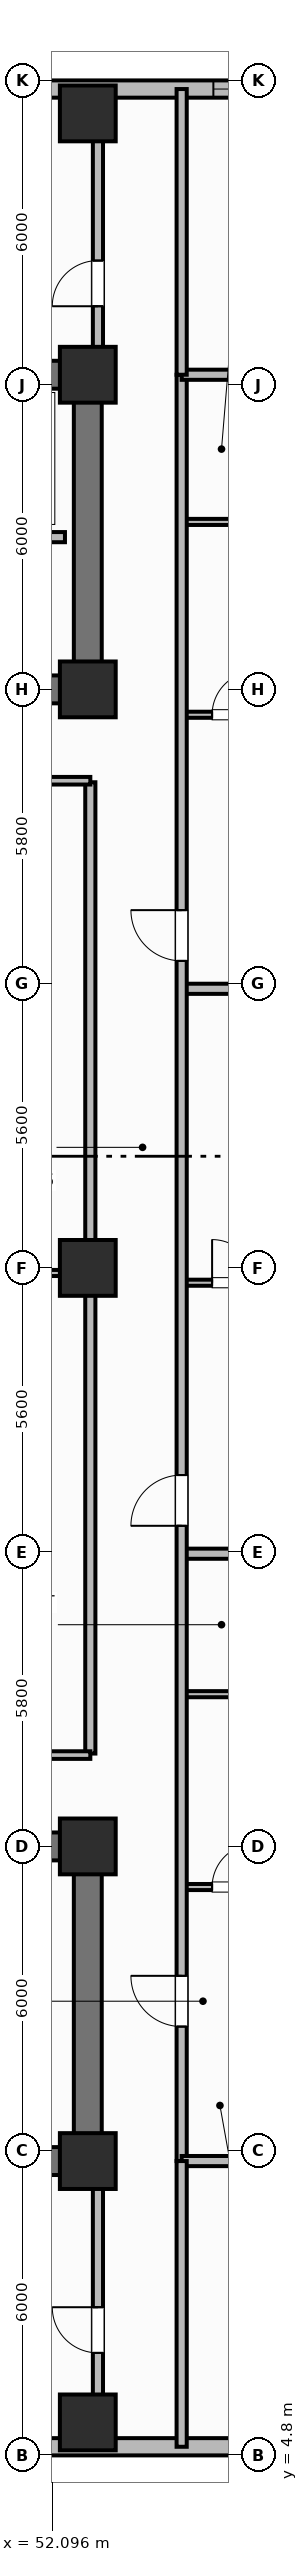
"""IFC4 building model, lengths in metres.
Left out: names, types, materials, properties, quantities, classifications, styles, units other than length and angle.
Written with IfcOpenShell. Run it as: python <this file> out.ifc"""

import sys

from ifc_helpers import new_model, si_unit, direction, frame, frame_2d, origin, origin_2d, place, context, subcontext, project, spatial, rectangle, extrude, element, fill, save


model = new_model("IFC4")
c1 = context("Model", 3, precision=1e-05, world=origin(), true_north=direction((0.0, 1.0)))
c2 = subcontext(c1, "Body", "Model", "MODEL_VIEW")
j1 = project(units=[si_unit("LENGTHUNIT", "METRE"), si_unit("PLANEANGLEUNIT", "RADIAN")], contexts=[c1])
p1 = place(None, origin())
s1 = spatial("IfcSite", under=j1, at=p1, CompositionType="ELEMENT")
p2 = place(p1, origin())
s2 = spatial("IfcBuilding", under=s1, at=p2, CompositionType="ELEMENT")
p3 = place(p2, frame((0.0, 0.0, 121.6)))
s3 = spatial("IfcBuildingStorey", under=s2, at=p3, CompositionType="ELEMENT", Elevation=121.6)
p4 = place(p3, frame((52.8, 10.6, 0.0), z_axis=(0.0, 0.0, 1.0), x_axis=(-1.0, 0.0, 0.0)))
e1 = element("IfcWall", 1, at=p4, inside=s3, PredefinedType="SHEAR", context=c2, shape_type="SweptSolid", body=[
    extrude(rectangle(XDim=27.2, YDim=0.55, at=frame_2d((13.6, 0.0))), origin(), (0.0, 0.0, 1.0), 3.7),
])
p5 = place(p3, frame((52.8, 10.875, 0.0), z_axis=(0.0, 0.0, 1.0), x_axis=(0.0, 1.0, 0.0)))
e2 = element("IfcWall", 2, at=p5, inside=s3, PredefinedType="SHEAR", context=c2, shape_type="SweptSolid", body=[
    extrude(rectangle(XDim=5.65, YDim=0.55, at=frame_2d((2.825, 0.0))), origin(), (0.0, 0.0, 1.0), 3.7),
])
p6 = place(p3, frame((25.6, 16.8, 0.0), z_axis=(0.0, 0.0, 1.0), x_axis=(1.0, 0.0, 0.0)))
e3 = element("IfcWall", 3, at=p6, inside=s3, PredefinedType="SHEAR", context=c2, shape_type="SweptSolid", body=[
    extrude(rectangle(XDim=27.2, YDim=0.55, at=frame_2d((13.6, 0.0))), origin(), (0.0, 0.0, 1.0), 3.7),
])
p7 = place(p6, frame((1.9, 0.0, 0.0)))
e4 = element("IfcOpeningElement", 4, at=p7, cuts=e3, PredefinedType="OPENING", context=c2, shape_type="SweptSolid", body=[
    extrude(rectangle(XDim=1.1, YDim=2.15, at=frame_2d((0.55, 1.075))), frame((0.0, 0.285, 0.0), z_axis=(0.0, -1.0, 0.0), x_axis=(1.0, 0.0, 0.0)), (0.0, 0.0, 1.0), 0.57),
])
p8 = place(p6, frame((13.0, 0.0, 0.0)))
e5 = element("IfcOpeningElement", 5, at=p8, cuts=e3, PredefinedType="OPENING", context=c2, shape_type="SweptSolid", body=[
    extrude(rectangle(XDim=1.2, YDim=2.15, at=frame_2d((0.6, 1.075))), frame((0.0, 0.285, 0.0), z_axis=(0.0, -1.0, 0.0), x_axis=(1.0, 0.0, 0.0)), (0.0, 0.0, 1.0), 0.57),
])
p9 = place(p6, frame((21.6, 0.0, 0.0)))
e6 = element("IfcOpeningElement", 6, at=p9, cuts=e3, PredefinedType="OPENING", context=c2, shape_type="SweptSolid", body=[
    extrude(rectangle(XDim=1.0, YDim=2.15, at=frame_2d((0.5, 1.075))), frame((0.0, 0.285, 0.0), z_axis=(0.0, -1.0, 0.0), x_axis=(1.0, 0.0, 0.0)), (0.0, 0.0, 1.0), 0.57),
])
p10 = place(p3, frame((25.6, 45.8, 0.0), z_axis=(0.0, 0.0, 1.0), x_axis=(1.0, 0.0, 0.0)))
e7 = element("IfcWall", 7, at=p10, inside=s3, PredefinedType="SHEAR", context=c2, shape_type="SweptSolid", body=[
    extrude(rectangle(XDim=27.2, YDim=0.55, at=frame_2d((13.6, 0.0))), origin(), (0.0, 0.0, 1.0), 3.7),
])
p11 = place(p3, frame((52.8, 39.875, 0.0), z_axis=(0.0, 0.0, 1.0), x_axis=(0.0, 1.0, 0.0)))
e8 = element("IfcWall", 8, at=p11, inside=s3, PredefinedType="SHEAR", context=c2, shape_type="SweptSolid", body=[
    extrude(rectangle(XDim=5.65, YDim=0.55, at=frame_2d((2.825, 0.0))), origin(), (0.0, 0.0, 1.0), 3.7),
])
p12 = place(p3, frame((52.8, 39.6, 0.0), z_axis=(0.0, 0.0, 1.0), x_axis=(-1.0, 0.0, 0.0)))
e9 = element("IfcWall", 9, at=p12, inside=s3, PredefinedType="SHEAR", context=c2, shape_type="SweptSolid", body=[
    extrude(rectangle(XDim=27.2, YDim=0.55, at=frame_2d((13.6, 0.0))), origin(), (0.0, 0.0, 1.0), 3.7),
])
p13 = place(p12, frame((24.2, 0.0, 0.0)))
e10 = element("IfcOpeningElement", 10, at=p13, cuts=e9, PredefinedType="OPENING", context=c2, shape_type="SweptSolid", body=[
    extrude(rectangle(XDim=1.1, YDim=2.15, at=frame_2d((0.55, 1.075))), frame((0.0, 0.285, 0.0), z_axis=(0.0, -1.0, 0.0), x_axis=(1.0, 0.0, 0.0)), (0.0, 0.0, 1.0), 0.57),
])
p14 = place(p12, frame((15.1, 0.0, 0.0)))
e11 = element("IfcOpeningElement", 11, at=p14, cuts=e9, PredefinedType="OPENING", context=c2, shape_type="SweptSolid", body=[
    extrude(rectangle(XDim=1.2, YDim=2.15, at=frame_2d((0.6, 1.075))), frame((0.0, 0.285, 0.0), z_axis=(0.0, -1.0, 0.0), x_axis=(1.0, 0.0, 0.0)), (0.0, 0.0, 1.0), 0.57),
])
p15 = place(p12, frame((11.3, 0.0, 0.0)))
e12 = element("IfcOpeningElement", 12, at=p15, cuts=e9, PredefinedType="OPENING", context=c2, shape_type="SweptSolid", body=[
    extrude(rectangle(XDim=1.3, YDim=2.2, at=frame_2d((0.65, 1.1))), frame((0.0, 0.285, 0.0), z_axis=(0.0, -1.0, 0.0), x_axis=(1.0, 0.0, 0.0)), (0.0, 0.0, 1.0), 0.57),
])
p16 = place(p12, frame((7.25, 0.0, 0.0)))
e13 = element("IfcOpeningElement", 13, at=p16, cuts=e9, PredefinedType="OPENING", context=c2, shape_type="SweptSolid", body=[
    extrude(rectangle(XDim=0.85, YDim=2.1, at=frame_2d((0.425, 1.05))), frame((0.0, 0.285, 0.0), z_axis=(0.0, -1.0, 0.0), x_axis=(1.0, 0.0, 0.0)), (0.0, 0.0, 1.0), 0.57),
])
p17 = place(p12, frame((3.0, 0.0, 0.0)))
e14 = element("IfcOpeningElement", 14, at=p17, cuts=e9, PredefinedType="OPENING", context=c2, shape_type="SweptSolid", body=[
    extrude(rectangle(XDim=0.9, YDim=2.1, at=frame_2d((0.45, 1.05))), frame((0.0, 0.285, 0.0), z_axis=(0.0, -1.0, 0.0), x_axis=(1.0, 0.0, 0.0)), (0.0, 0.0, 1.0), 0.57),
])
for number, where, z_axis, x_axis in (
    (15, (52.8, 10.6, 0.0), (0.0, 0.0, 1.0), (1.0, 0.0, 0.0)),
    (16, (52.8, 16.8, 0.0), (0.0, 0.0, 1.0), (1.0, 0.0, 0.0)),
    (17, (52.8, 39.6, 0.0), (0.0, 0.0, 1.0), (1.0, 0.0, 0.0)),
    (18, (52.8, 45.8, 0.0), (0.0, 0.0, 1.0), (1.0, 0.0, 0.0)),
    (19, (52.8, 28.2, 0.0), (0.0, 0.0, 1.0), (1.0, 0.0, 0.0)),
    (20, (52.8, 5.45, 0.0), (0.0, 0.0, 1.0), (1.0, 0.0, 0.0)),
    (21, (52.8, 50.95, 0.0), (0.0, 0.0, 1.0), (1.0, 0.0, 0.0)),
):
    element("IfcColumn", number, at=place(p3, frame(where, z_axis=z_axis, x_axis=x_axis)), inside=s3, PredefinedType="COLUMN", context=c2, shape_type="SweptSolid", body=[
        extrude(rectangle(XDim=1.1, YDim=1.1, at=origin_2d()), origin(), (0.0, 0.0, 1.0), 3.7),
    ])
p18 = place(p3, frame((42.4, 4.97, 0.0), z_axis=(0.0, 0.0, 1.0), x_axis=(1.0, 0.0, 0.0)))
e22 = element("IfcWall", 22, at=p18, inside=s3, PredefinedType="SOLIDWALL", context=c2, shape_type="SweptSolid", body=[
    extrude(rectangle(XDim=17.4, YDim=0.34, at=frame_2d((8.7, 0.0))), origin(), (0.0, 0.0, 1.0), 2.7),
])
p19 = place(p18, frame((5.788, 0.0, 0.73)))
e23 = element("IfcOpeningElement", 23, at=p19, cuts=e22, PredefinedType="OPENING", context=c2, shape_type="SweptSolid", body=[
    extrude(rectangle(XDim=1.8, YDim=1.85, at=frame_2d((0.9, 0.925))), frame((0.0, 0.18, 0.0), z_axis=(0.0, -1.0, 0.0), x_axis=(1.0, 0.0, 0.0)), (0.0, 0.0, 1.0), 0.36),
])
p20 = place(p18, frame((13.837, 0.0, 0.73)))
e24 = element("IfcOpeningElement", 24, at=p20, cuts=e22, PredefinedType="OPENING", context=c2, shape_type="SweptSolid", body=[
    extrude(rectangle(XDim=1.8, YDim=1.85, at=frame_2d((0.9, 0.925))), frame((0.0, 0.18, 0.0), z_axis=(0.0, -1.0, 0.0), x_axis=(1.0, 0.0, 0.0)), (0.0, 0.0, 1.0), 0.36),
])
p21 = place(p3, frame((59.8, 51.43, 0.0), z_axis=(0.0, 0.0, 1.0), x_axis=(-1.0, 0.0, 0.0)))
e25 = element("IfcWall", 25, at=p21, inside=s3, PredefinedType="SOLIDWALL", context=c2, shape_type="SweptSolid", body=[
    extrude(rectangle(XDim=17.4, YDim=0.34, at=frame_2d((8.7, 0.0))), origin(), (0.0, 0.0, 1.0), 2.7),
])
p22 = place(p21, frame((1.442, 0.0, 0.93)))
e26 = element("IfcOpeningElement", 26, at=p22, cuts=e25, PredefinedType="OPENING", context=c2, shape_type="SweptSolid", body=[
    extrude(rectangle(XDim=1.1, YDim=1.65, at=frame_2d((0.55, 0.825))), frame((0.0, 0.18, 0.0), z_axis=(0.0, -1.0, 0.0), x_axis=(1.0, 0.0, 0.0)), (0.0, 0.0, 1.0), 0.36),
])
p23 = place(p21, frame((3.425, 0.0, 0.93)))
e27 = element("IfcOpeningElement", 27, at=p23, cuts=e25, PredefinedType="OPENING", context=c2, shape_type="SweptSolid", body=[
    extrude(rectangle(XDim=1.1, YDim=1.65, at=frame_2d((0.55, 0.825))), frame((0.0, 0.18, 0.0), z_axis=(0.0, -1.0, 0.0), x_axis=(1.0, 0.0, 0.0)), (0.0, 0.0, 1.0), 0.36),
])
p24 = place(p21, frame((9.492, 0.0, 0.93)))
e28 = element("IfcOpeningElement", 28, at=p24, cuts=e25, PredefinedType="OPENING", context=c2, shape_type="SweptSolid", body=[
    extrude(rectangle(XDim=1.1, YDim=1.65, at=frame_2d((0.55, 0.825))), frame((0.0, 0.18, 0.0), z_axis=(0.0, -1.0, 0.0), x_axis=(1.0, 0.0, 0.0)), (0.0, 0.0, 1.0), 0.36),
])
p25 = place(p21, frame((12.175, 0.0, 0.93)))
e29 = element("IfcOpeningElement", 29, at=p25, cuts=e25, PredefinedType="OPENING", context=c2, shape_type="SweptSolid", body=[
    extrude(rectangle(XDim=1.1, YDim=1.65, at=frame_2d((0.55, 0.825))), frame((0.0, 0.18, 0.0), z_axis=(0.0, -1.0, 0.0), x_axis=(1.0, 0.0, 0.0)), (0.0, 0.0, 1.0), 0.36),
])
p26 = place(p3, frame((52.35, 42.6, 0.0), z_axis=(0.0, 0.0, 1.0), x_axis=(-1.0, 0.0, 0.0)))
e30 = element("IfcWall", 30, at=p26, inside=s3, PredefinedType="PARTITIONING", context=c2, shape_type="SweptSolid", body=[
    extrude(rectangle(XDim=8.8, YDim=0.2, at=frame_2d((4.4, 0.0))), origin(), (0.0, 0.0, 1.0), 2.53),
])
p27 = place(p26, frame((7.1, 0.0, 0.0)))
e31 = element("IfcOpeningElement", 31, at=p27, cuts=e30, PredefinedType="OPENING", context=c2, shape_type="SweptSolid", body=[
    extrude(rectangle(XDim=1.0, YDim=2.15, at=frame_2d((0.5, 1.075))), frame((0.0, 0.11, 0.0), z_axis=(0.0, -1.0, 0.0), x_axis=(1.0, 0.0, 0.0)), (0.0, 0.0, 1.0), 0.22),
])
p28 = place(p3, frame((52.85, 18.63, 0.0), z_axis=(0.0, 0.0, 1.0), x_axis=(0.0, 1.0, 0.0)))
e32 = element("IfcWall", 32, at=p28, inside=s3, PredefinedType="PARTITIONING", context=c2, shape_type="SweptSolid", body=[
    extrude(rectangle(XDim=19.14, YDim=0.2, at=frame_2d((9.57, 0.0))), origin(), (0.0, 0.0, 1.0), 2.53),
])
for number, where, z_axis, x_axis in (
    (33, (46.35, 18.6, 0.0), (0.0, 0.0, 1.0), (1.0, 0.0, 0.0)),
    (34, (46.35, 37.8, 0.0), (0.0, 0.0, 1.0), (1.0, 0.0, 0.0)),
):
    element("IfcWall", number, at=place(p3, frame(where, z_axis=z_axis, x_axis=x_axis)), inside=s3, PredefinedType="PARTITIONING", context=c2, shape_type="SweptSolid", body=[
        extrude(rectangle(XDim=6.5, YDim=0.15, at=frame_2d((3.25, 0.0))), origin(), (0.0, 0.0, 1.0), 2.53),
    ])
p29 = place(p3, frame((46.38, 28.1, 0.0), z_axis=(0.0, 0.0, 1.0), x_axis=(1.0, 0.0, 0.0)))
e35 = element("IfcWall", 35, at=p29, inside=s3, PredefinedType="PARTITIONING", context=c2, shape_type="SweptSolid", body=[
    extrude(rectangle(XDim=6.42, YDim=0.12, at=frame_2d((3.21, 0.0))), origin(), (0.0, 0.0, 1.0), 2.53),
])
p30 = place(p3, frame((54.65, 16.0, 0.0), z_axis=(0.0, 0.0, 1.0), x_axis=(1.0, 0.0, 0.0)))
e36 = element("IfcWall", 36, at=p30, inside=s3, PredefinedType="PARTITIONING", context=c2, shape_type="SweptSolid", body=[
    extrude(rectangle(XDim=2.25, YDim=0.12, at=frame_2d((1.125, 0.0))), origin(), (0.0, 0.0, 1.0), 2.53),
])
p31 = place(p30, frame((0.6, 0.0, 0.0)))
e37 = element("IfcOpeningElement", 37, at=p31, cuts=e36, PredefinedType="OPENING", context=c2, shape_type="SweptSolid", body=[
    extrude(rectangle(XDim=0.85, YDim=2.1, at=frame_2d((0.425, 1.05))), frame((0.0, 0.07, 0.0), z_axis=(0.0, -1.0, 0.0), x_axis=(1.0, 0.0, 0.0)), (0.0, 0.0, 1.0), 0.14),
])
p32 = place(p3, frame((54.65, 19.8, 0.0), z_axis=(0.0, 0.0, 1.0), x_axis=(1.0, 0.0, 0.0)))
e38 = element("IfcWall", 38, at=p32, inside=s3, PredefinedType="PARTITIONING", context=c2, shape_type="SweptSolid", body=[
    extrude(rectangle(XDim=2.25, YDim=0.12, at=frame_2d((1.125, 0.0))), origin(), (0.0, 0.0, 1.0), 2.53),
])
p33 = place(p3, frame((54.65, 22.568, 0.0), z_axis=(0.0, 0.0, 1.0), x_axis=(1.0, 0.0, 0.0)))
e39 = element("IfcWall", 39, at=p33, inside=s3, PredefinedType="PARTITIONING", context=c2, shape_type="SweptSolid", body=[
    extrude(rectangle(XDim=9.18, YDim=0.2, at=frame_2d((4.59, 0.0))), origin(), (0.0, 0.0, 1.0), 2.53),
])
p34 = place(p3, frame((54.65, 27.908, 0.0), z_axis=(0.0, 0.0, 1.0), x_axis=(1.0, 0.0, 0.0)))
e40 = element("IfcWall", 40, at=p34, inside=s3, PredefinedType="PARTITIONING", context=c2, shape_type="SweptSolid", body=[
    extrude(rectangle(XDim=2.25, YDim=0.12, at=frame_2d((1.125, 0.0))), origin(), (0.0, 0.0, 1.0), 2.53),
])
p35 = place(p34, frame((0.6, 0.0, 0.0)))
e41 = element("IfcOpeningElement", 41, at=p35, cuts=e40, PredefinedType="OPENING", context=c2, shape_type="SweptSolid", body=[
    extrude(rectangle(XDim=0.85, YDim=2.1, at=frame_2d((0.425, 1.05))), frame((0.0, 0.07, 0.0), z_axis=(0.0, -1.0, 0.0), x_axis=(1.0, 0.0, 0.0)), (0.0, 0.0, 1.0), 0.14),
])
p36 = place(p3, frame((54.65, 33.7, 0.0), z_axis=(0.0, 0.0, 1.0), x_axis=(1.0, 0.0, 0.0)))
e42 = element("IfcWall", 42, at=p36, inside=s3, PredefinedType="PARTITIONING", context=c2, shape_type="SweptSolid", body=[
    extrude(rectangle(XDim=9.18, YDim=0.2, at=frame_2d((4.59, 0.0))), origin(), (0.0, 0.0, 1.0), 2.53),
])
p37 = place(p3, frame((54.65, 39.1, 0.0), z_axis=(0.0, 0.0, 1.0), x_axis=(1.0, 0.0, 0.0)))
e43 = element("IfcWall", 43, at=p37, inside=s3, PredefinedType="PARTITIONING", context=c2, shape_type="SweptSolid", body=[
    extrude(rectangle(XDim=2.25, YDim=0.12, at=frame_2d((1.125, 0.0))), origin(), (0.0, 0.0, 1.0), 2.53),
])
p38 = place(p37, frame((0.6, 0.0, 0.0)))
e44 = element("IfcOpeningElement", 44, at=p38, cuts=e43, PredefinedType="OPENING", context=c2, shape_type="SweptSolid", body=[
    extrude(rectangle(XDim=0.85, YDim=2.1, at=frame_2d((0.425, 1.05))), frame((0.0, 0.07, 0.0), z_axis=(0.0, -1.0, 0.0), x_axis=(1.0, 0.0, 0.0)), (0.0, 0.0, 1.0), 0.14),
])
p39 = place(p3, frame((54.65, 42.9, 0.0), z_axis=(0.0, 0.0, 1.0), x_axis=(1.0, 0.0, 0.0)))
e45 = element("IfcWall", 45, at=p39, inside=s3, PredefinedType="PARTITIONING", context=c2, shape_type="SweptSolid", body=[
    extrude(rectangle(XDim=2.25, YDim=0.12, at=frame_2d((1.125, 0.0))), origin(), (0.0, 0.0, 1.0), 2.53),
])
p40 = place(p3, frame((54.65, 10.6, 0.0), z_axis=(0.0, 0.0, 1.0), x_axis=(0.0, 1.0, 0.0)))
e46 = element("IfcWall", 46, at=p40, inside=s3, PredefinedType="PARTITIONING", context=c2, shape_type="SweptSolid", body=[
    extrude(rectangle(XDim=35.2, YDim=0.2, at=frame_2d((17.6, 0.0))), origin(), (0.0, 0.0, 1.0), 2.53),
])
p41 = place(p40, frame((2.65, 0.0, 0.0)))
e47 = element("IfcOpeningElement", 47, at=p41, cuts=e46, PredefinedType="OPENING", context=c2, shape_type="SweptSolid", body=[
    extrude(rectangle(XDim=1.0, YDim=2.15, at=frame_2d((0.5, 1.075))), frame((0.0, 0.11, 0.0), z_axis=(0.0, -1.0, 0.0), x_axis=(1.0, 0.0, 0.0)), (0.0, 0.0, 1.0), 0.22),
])
p42 = place(p40, frame((12.518, 0.0, 0.0)))
e48 = element("IfcOpeningElement", 48, at=p42, cuts=e46, PredefinedType="OPENING", context=c2, shape_type="SweptSolid", body=[
    extrude(rectangle(XDim=1.0, YDim=2.15, at=frame_2d((0.5, 1.075))), frame((0.0, 0.11, 0.0), z_axis=(0.0, -1.0, 0.0), x_axis=(1.0, 0.0, 0.0)), (0.0, 0.0, 1.0), 0.22),
])
p43 = place(p40, frame((23.65, 0.0, 0.0)))
e49 = element("IfcOpeningElement", 49, at=p43, cuts=e46, PredefinedType="OPENING", context=c2, shape_type="SweptSolid", body=[
    extrude(rectangle(XDim=1.0, YDim=2.15, at=frame_2d((0.5, 1.075))), frame((0.0, 0.11, 0.0), z_axis=(0.0, -1.0, 0.0), x_axis=(1.0, 0.0, 0.0)), (0.0, 0.0, 1.0), 0.22),
])
for number, where, z_axis, x_axis in (
    (50, (54.65, 10.6, 0.0), (0.0, 0.0, 1.0), (1.0, 0.0, 0.0)),
    (51, (54.65, 45.8, 0.0), (0.0, 0.0, 1.0), (1.0, 0.0, 0.0)),
):
    element("IfcWall", number, at=place(p3, frame(where, z_axis=z_axis, x_axis=x_axis)), inside=s3, PredefinedType="PARTITIONING", context=c2, shape_type="SweptSolid", body=[
        extrude(rectangle(XDim=8.76, YDim=0.2, at=frame_2d((4.38, 0.0))), origin(), (0.0, 0.0, 1.0), 2.53),
    ])
p44 = place(p3, frame((54.65, 4.97, 0.0), z_axis=(0.0, 0.0, 1.0), x_axis=(0.0, 1.0, 0.0)))
e52 = element("IfcWall", 52, at=p44, inside=s3, PredefinedType="PARTITIONING", context=c2, shape_type="SweptSolid", body=[
    extrude(rectangle(XDim=5.63, YDim=0.2, at=frame_2d((2.815, 0.0))), origin(), (0.0, 0.0, 1.0), 2.53),
])
p45 = place(p3, frame((54.65, 45.8, 0.0), z_axis=(0.0, 0.0, 1.0), x_axis=(0.0, 1.0, 0.0)))
e53 = element("IfcWall", 53, at=p45, inside=s3, PredefinedType="PARTITIONING", context=c2, shape_type="SweptSolid", body=[
    extrude(rectangle(XDim=5.63, YDim=0.2, at=frame_2d((2.815, 0.0))), origin(), (0.0, 0.0, 1.0), 2.53),
])
p46 = place(p3, frame((53.0, 5.77, 0.0), z_axis=(0.0, 0.0, 1.0), x_axis=(0.0, 1.0, 0.0)))
e54 = element("IfcWall", 54, at=p46, inside=s3, PredefinedType="PARTITIONING", context=c2, shape_type="SweptSolid", body=[
    extrude(rectangle(XDim=4.53, YDim=0.2, at=frame_2d((2.265, 0.0))), origin(), (0.0, 0.0, 1.0), 2.53),
])
p47 = place(p46, frame((1.05, 0.0, 0.0)))
e55 = element("IfcOpeningElement", 55, at=p47, cuts=e54, PredefinedType="OPENING", context=c2, shape_type="SweptSolid", body=[
    extrude(rectangle(XDim=0.9, YDim=2.1, at=frame_2d((0.45, 1.05))), frame((0.0, 0.11, 0.0), z_axis=(0.0, -1.0, 0.0), x_axis=(1.0, 0.0, 0.0)), (0.0, 0.0, 1.0), 0.22),
])
p48 = place(p3, frame((53.0, 46.1, 0.0), z_axis=(0.0, 0.0, 1.0), x_axis=(0.0, 1.0, 0.0)))
e56 = element("IfcWall", 56, at=p48, inside=s3, PredefinedType="PARTITIONING", context=c2, shape_type="SweptSolid", body=[
    extrude(rectangle(XDim=4.53, YDim=0.2, at=frame_2d((2.265, 0.0))), origin(), (0.0, 0.0, 1.0), 2.53),
])
p49 = place(p48, frame((1.05, 0.0, 0.0)))
e57 = element("IfcOpeningElement", 57, at=p49, cuts=e56, PredefinedType="OPENING", context=c2, shape_type="SweptSolid", body=[
    extrude(rectangle(XDim=0.9, YDim=2.1, at=frame_2d((0.45, 1.05))), frame((0.0, 0.11, 0.0), z_axis=(0.0, -1.0, 0.0), x_axis=(1.0, 0.0, 0.0)), (0.0, 0.0, 1.0), 0.22),
])
p50 = place(p23, origin())
e58 = element("IfcWindow", 58, at=p50, inside=s3, PartitioningType="SINGLE_PANEL", PredefinedType="WINDOW", context=c2, shape_type="SweptSolid", body=[
    extrude(rectangle(XDim=1.1, YDim=1.65, at=frame_2d((0.55, 0.825))), frame((0.0, 0.03, 0.0), z_axis=(0.0, -1.0, 0.0), x_axis=(1.0, 0.0, 0.0)), (0.0, 0.0, 1.0), 0.06),
])
fill(e27, e58)
p51 = place(p31, origin())
e59 = element("IfcDoor", 59, at=p51, inside=s3, OperationType="SINGLE_SWING_RIGHT", PredefinedType="DOOR", context=c2, shape_type="SweptSolid", body=[
    extrude(rectangle(XDim=0.85, YDim=2.1, at=frame_2d((0.425, 1.05))), frame((0.0, 0.025, 0.0), z_axis=(0.0, -1.0, 0.0), x_axis=(1.0, 0.0, 0.0)), (0.0, 0.0, 1.0), 0.05),
])
fill(e37, e59)
p52 = place(p35, origin())
e60 = element("IfcDoor", 60, at=p52, inside=s3, OperationType="SINGLE_SWING_LEFT", PredefinedType="DOOR", context=c2, shape_type="SweptSolid", body=[
    extrude(rectangle(XDim=0.85, YDim=2.1, at=frame_2d((0.425, 1.05))), frame((0.0, 0.025, 0.0), z_axis=(0.0, -1.0, 0.0), x_axis=(1.0, 0.0, 0.0)), (0.0, 0.0, 1.0), 0.05),
])
fill(e41, e60)
p53 = place(p38, origin())
e61 = element("IfcDoor", 61, at=p53, inside=s3, OperationType="SINGLE_SWING_RIGHT", PredefinedType="DOOR", context=c2, shape_type="SweptSolid", body=[
    extrude(rectangle(XDim=0.85, YDim=2.1, at=frame_2d((0.425, 1.05))), frame((0.0, 0.025, 0.0), z_axis=(0.0, -1.0, 0.0), x_axis=(1.0, 0.0, 0.0)), (0.0, 0.0, 1.0), 0.05),
])
fill(e44, e61)
p54 = place(p41, origin())
e62 = element("IfcDoor", 62, at=p54, inside=s3, OperationType="SINGLE_SWING_RIGHT", PredefinedType="DOOR", context=c2, shape_type="SweptSolid", body=[
    extrude(rectangle(XDim=1.0, YDim=2.15, at=frame_2d((0.5, 1.075))), frame((0.0, 0.025, 0.0), z_axis=(0.0, -1.0, 0.0), x_axis=(1.0, 0.0, 0.0)), (0.0, 0.0, 1.0), 0.05),
])
fill(e47, e62)
p55 = place(p42, origin())
e63 = element("IfcDoor", 63, at=p55, inside=s3, OperationType="SINGLE_SWING_LEFT", PredefinedType="DOOR", context=c2, shape_type="SweptSolid", body=[
    extrude(rectangle(XDim=1.0, YDim=2.15, at=frame_2d((0.5, 1.075))), frame((0.0, 0.025, 0.0), z_axis=(0.0, -1.0, 0.0), x_axis=(1.0, 0.0, 0.0)), (0.0, 0.0, 1.0), 0.05),
])
fill(e48, e63)
p56 = place(p43, origin())
e64 = element("IfcDoor", 64, at=p56, inside=s3, OperationType="SINGLE_SWING_RIGHT", PredefinedType="DOOR", context=c2, shape_type="SweptSolid", body=[
    extrude(rectangle(XDim=1.0, YDim=2.15, at=frame_2d((0.5, 1.075))), frame((0.0, 0.025, 0.0), z_axis=(0.0, -1.0, 0.0), x_axis=(1.0, 0.0, 0.0)), (0.0, 0.0, 1.0), 0.05),
])
fill(e49, e64)
p57 = place(p47, origin())
e65 = element("IfcDoor", 65, at=p57, inside=s3, OperationType="SINGLE_SWING_RIGHT", PredefinedType="DOOR", context=c2, shape_type="SweptSolid", body=[
    extrude(rectangle(XDim=0.9, YDim=2.1, at=frame_2d((0.45, 1.05))), frame((0.0, 0.025, 0.0), z_axis=(0.0, -1.0, 0.0), x_axis=(1.0, 0.0, 0.0)), (0.0, 0.0, 1.0), 0.05),
])
fill(e55, e65)
p58 = place(p49, origin())
e66 = element("IfcDoor", 66, at=p58, inside=s3, OperationType="SINGLE_SWING_LEFT", PredefinedType="DOOR", context=c2, shape_type="SweptSolid", body=[
    extrude(rectangle(XDim=0.9, YDim=2.1, at=frame_2d((0.45, 1.05))), frame((0.0, 0.025, 0.0), z_axis=(0.0, -1.0, 0.0), x_axis=(1.0, 0.0, 0.0)), (0.0, 0.0, 1.0), 0.05),
])
fill(e57, e66)
save(model, sys.argv[1])
